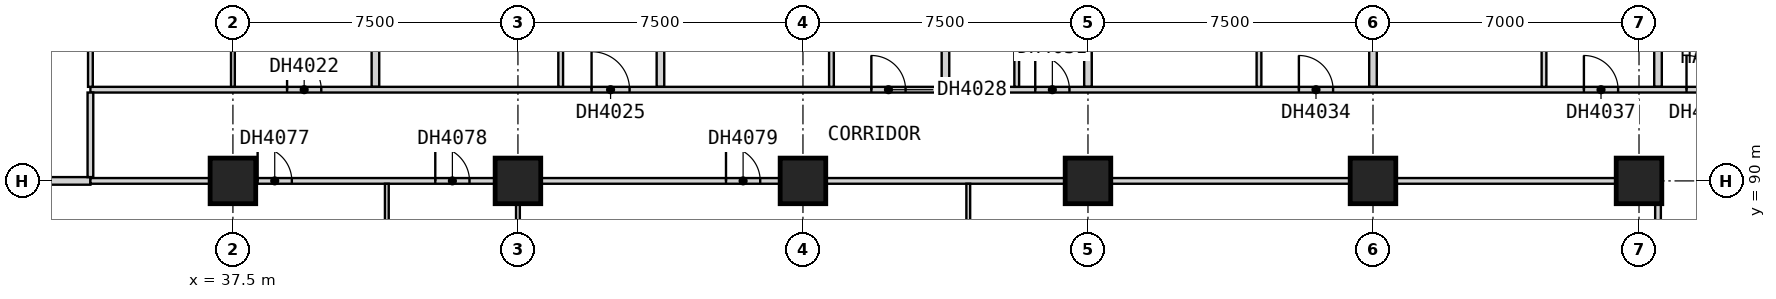
"""IFC4 building model, lengths in metres.
Left out: names, types, materials, properties, quantities, classifications, styles, units other than length and angle.
Written with IfcOpenShell. Run it as: python <this file> out.ifc"""

import sys

from ifc_helpers import new_model, si_unit, direction, frame, frame_2d, origin, origin_2d, place, context, subcontext, project, spatial, rectangle, extrude, element, fill, save


model = new_model("IFC4")
c1 = context("Model", 3, precision=1e-05, world=origin(), true_north=direction((0.0, 1.0)))
c2 = subcontext(c1, "Body", "Model", "MODEL_VIEW")
j1 = project(units=[si_unit("LENGTHUNIT", "METRE"), si_unit("PLANEANGLEUNIT", "RADIAN")], contexts=[c1])
p1 = place(None, origin())
s1 = spatial("IfcSite", under=j1, at=p1, CompositionType="ELEMENT")
p2 = place(p1, origin())
s2 = spatial("IfcBuilding", under=s1, at=p2, CompositionType="ELEMENT")
p3 = place(p2, frame((0.0, 0.0, 44.8)))
s3 = spatial("IfcBuildingStorey", under=s2, at=p3, CompositionType="ELEMENT", Elevation=44.8)
for number, where, z_axis, x_axis in (
    (1, (37.5, 90.0, 0.0), (0.0, 0.0, 1.0), (1.0, 0.0, 0.0)),
    (2, (45.0, 90.0, 0.0), (0.0, 0.0, 1.0), (1.0, 0.0, 0.0)),
    (3, (52.5, 90.0, 0.0), (0.0, 0.0, 1.0), (1.0, 0.0, 0.0)),
    (4, (60.0, 90.0, 0.0), (0.0, 0.0, 1.0), (1.0, 0.0, 0.0)),
    (5, (67.5, 90.0, 0.0), (0.0, 0.0, 1.0), (1.0, 0.0, 0.0)),
    (6, (74.5, 90.0, 0.0), (0.0, 0.0, 1.0), (1.0, 0.0, 0.0)),
):
    element("IfcColumn", number, at=place(p3, frame(where, z_axis=z_axis, x_axis=x_axis)), inside=s3, PredefinedType="COLUMN", context=c2, shape_type="SweptSolid", body=[
        extrude(rectangle(XDim=1.2, YDim=1.2, at=origin_2d()), origin(), (0.0, 0.0, 1.0), 3.6),
    ])
p4 = place(p3, frame((30.0, 90.0, 0.0), z_axis=(0.0, 0.0, 1.0), x_axis=(1.0, 0.0, 0.0)))
e7 = element("IfcWall", 7, at=p4, inside=s3, PredefinedType="PARTITIONING", context=c2, shape_type="SweptSolid", body=[
    extrude(rectangle(XDim=3.75, YDim=0.2, at=frame_2d((1.875, 0.0))), origin(), (0.0, 0.0, 1.0), 3.35),
])
for number, where, z_axis, x_axis in (
    (8, (41.25, 92.475, 0.0), (0.0, 0.0, 1.0), (0.0, 1.0, 0.0)),
    (9, (48.75, 92.475, 0.0), (0.0, 0.0, 1.0), (0.0, 1.0, 0.0)),
    (10, (56.25, 92.475, 0.0), (0.0, 0.0, 1.0), (0.0, 1.0, 0.0)),
):
    element("IfcWall", number, at=place(p3, frame(where, z_axis=z_axis, x_axis=x_axis)), inside=s3, PredefinedType="PARTITIONING", context=c2, shape_type="SweptSolid", body=[
        extrude(rectangle(XDim=11.715, YDim=0.2, at=frame_2d((5.857, 0.0))), origin(), (0.0, 0.0, 1.0), 3.35),
    ])
for number, where, z_axis, x_axis in (
    (11, (60.0, 92.475, 0.0), (0.0, 0.0, 1.0), (0.0, 1.0, 0.0)),
    (12, (67.5, 92.475, 0.0), (0.0, 0.0, 1.0), (0.0, 1.0, 0.0)),
):
    element("IfcWall", number, at=place(p3, frame(where, z_axis=z_axis, x_axis=x_axis)), inside=s3, PredefinedType="PARTITIONING", context=c2, shape_type="SweptSolid", body=[
        extrude(rectangle(XDim=12.525, YDim=0.2, at=frame_2d((6.262, 0.0))), origin(), (0.0, 0.0, 1.0), 3.35),
    ])
p5 = place(p3, frame((75.0, 92.475, 0.0), z_axis=(0.0, 0.0, 1.0), x_axis=(0.0, 1.0, 0.0)))
e13 = element("IfcWall", 13, at=p5, inside=s3, PredefinedType="PARTITIONING", context=c2, shape_type="SweptSolid", body=[
    extrude(rectangle(XDim=11.715, YDim=0.2, at=frame_2d((5.857, 0.0))), origin(), (0.0, 0.0, 1.0), 3.35),
])
p6 = place(p3, frame((33.75, 90.0, 0.0), z_axis=(0.0, 0.0, 1.0), x_axis=(1.0, 0.0, 0.0)))
e14 = element("IfcWall", 14, at=p6, inside=s3, PredefinedType="PARTITIONING", context=c2, shape_type="SweptSolid", body=[
    extrude(rectangle(XDim=41.25, YDim=0.15, at=frame_2d((20.625, 0.0))), origin(), (0.0, 0.0, 1.0), 3.35),
])
p7 = place(p6, frame((4.4, 0.0, 0.0)))
e15 = element("IfcOpeningElement", 15, at=p7, cuts=e14, PredefinedType="OPENING", context=c2, shape_type="SweptSolid", body=[
    extrude(rectangle(XDim=0.9, YDim=2.1, at=frame_2d((0.45, 1.05))), frame((0.0, 0.085, 0.0), z_axis=(0.0, -1.0, 0.0), x_axis=(1.0, 0.0, 0.0)), (0.0, 0.0, 1.0), 0.17),
])
p8 = place(p6, frame((9.075, 0.0, 0.0)))
e16 = element("IfcOpeningElement", 16, at=p8, cuts=e14, PredefinedType="OPENING", context=c2, shape_type="SweptSolid", body=[
    extrude(rectangle(XDim=0.9, YDim=2.1, at=frame_2d((0.45, 1.05))), frame((0.0, 0.085, 0.0), z_axis=(0.0, -1.0, 0.0), x_axis=(1.0, 0.0, 0.0)), (0.0, 0.0, 1.0), 0.17),
])
p9 = place(p6, frame((16.725, 0.0, 0.0)))
e17 = element("IfcOpeningElement", 17, at=p9, cuts=e14, PredefinedType="OPENING", context=c2, shape_type="SweptSolid", body=[
    extrude(rectangle(XDim=0.9, YDim=2.1, at=frame_2d((0.45, 1.05))), frame((0.0, 0.085, 0.0), z_axis=(0.0, -1.0, 0.0), x_axis=(1.0, 0.0, 0.0)), (0.0, 0.0, 1.0), 0.17),
])
p10 = place(p3, frame((33.75, 92.4, 0.0), z_axis=(0.0, 0.0, 1.0), x_axis=(1.0, 0.0, 0.0)))
e18 = element("IfcWall", 18, at=p10, inside=s3, PredefinedType="PARTITIONING", context=c2, shape_type="SweptSolid", body=[
    extrude(rectangle(XDim=43.65, YDim=0.15, at=frame_2d((21.825, 0.0))), origin(), (0.0, 0.0, 1.0), 3.35),
])
p11 = place(p10, frame((5.175, 0.0, 0.0)))
e19 = element("IfcOpeningElement", 19, at=p11, cuts=e18, PredefinedType="OPENING", context=c2, shape_type="SweptSolid", body=[
    extrude(rectangle(XDim=0.9, YDim=2.1, at=frame_2d((0.45, 1.05))), frame((0.0, 0.085, 0.0), z_axis=(0.0, -1.0, 0.0), x_axis=(1.0, 0.0, 0.0)), (0.0, 0.0, 1.0), 0.17),
])
p12 = place(p10, frame((13.188, 0.0, 0.0)))
e20 = element("IfcOpeningElement", 20, at=p12, cuts=e18, PredefinedType="OPENING", context=c2, shape_type="SweptSolid", body=[
    extrude(rectangle(XDim=1.0, YDim=2.1, at=frame_2d((0.5, 1.05))), frame((0.0, 0.085, 0.0), z_axis=(0.0, -1.0, 0.0), x_axis=(1.0, 0.0, 0.0)), (0.0, 0.0, 1.0), 0.17),
])
p13 = place(p10, frame((20.55, 0.0, 0.0)))
e21 = element("IfcOpeningElement", 21, at=p13, cuts=e18, PredefinedType="OPENING", context=c2, shape_type="SweptSolid", body=[
    extrude(rectangle(XDim=0.9, YDim=2.1, at=frame_2d((0.45, 1.05))), frame((0.0, 0.085, 0.0), z_axis=(0.0, -1.0, 0.0), x_axis=(1.0, 0.0, 0.0)), (0.0, 0.0, 1.0), 0.17),
])
p14 = place(p10, frame((24.863, 0.0, 0.0)))
e22 = element("IfcOpeningElement", 22, at=p14, cuts=e18, PredefinedType="OPENING", context=c2, shape_type="SweptSolid", body=[
    extrude(rectangle(XDim=0.9, YDim=2.1, at=frame_2d((0.45, 1.05))), frame((0.0, 0.085, 0.0), z_axis=(0.0, -1.0, 0.0), x_axis=(1.0, 0.0, 0.0)), (0.0, 0.0, 1.0), 0.17),
])
p15 = place(p10, frame((31.8, 0.0, 0.0)))
e23 = element("IfcOpeningElement", 23, at=p15, cuts=e18, PredefinedType="OPENING", context=c2, shape_type="SweptSolid", body=[
    extrude(rectangle(XDim=0.9, YDim=2.1, at=frame_2d((0.45, 1.05))), frame((0.0, 0.085, 0.0), z_axis=(0.0, -1.0, 0.0), x_axis=(1.0, 0.0, 0.0)), (0.0, 0.0, 1.0), 0.17),
])
p16 = place(p10, frame((39.3, 0.0, 0.0)))
e24 = element("IfcOpeningElement", 24, at=p16, cuts=e18, PredefinedType="OPENING", context=c2, shape_type="SweptSolid", body=[
    extrude(rectangle(XDim=0.9, YDim=2.1, at=frame_2d((0.45, 1.05))), frame((0.0, 0.085, 0.0), z_axis=(0.0, -1.0, 0.0), x_axis=(1.0, 0.0, 0.0)), (0.0, 0.0, 1.0), 0.17),
])
p17 = place(p10, frame((42.0, 0.0, 0.0)))
e25 = element("IfcOpeningElement", 25, at=p17, cuts=e18, PredefinedType="OPENING", context=c2, shape_type="SweptSolid", body=[
    extrude(rectangle(XDim=0.9, YDim=2.1, at=frame_2d((0.45, 1.05))), frame((0.0, 0.085, 0.0), z_axis=(0.0, -1.0, 0.0), x_axis=(1.0, 0.0, 0.0)), (0.0, 0.0, 1.0), 0.17),
])
p18 = place(p3, frame((33.75, 90.1, 0.0), z_axis=(0.0, 0.0, 1.0), x_axis=(0.0, 1.0, 0.0)))
e26 = element("IfcWall", 26, at=p18, inside=s3, PredefinedType="PARTITIONING", context=c2, shape_type="SweptSolid", body=[
    extrude(rectangle(XDim=2.225, YDim=0.15, at=frame_2d((1.112, 0.0))), origin(), (0.0, 0.0, 1.0), 3.35),
])
p19 = place(p3, frame((75.0, 78.075, 0.0), z_axis=(0.0, 0.0, 1.0), x_axis=(0.0, 1.0, 0.0)))
e27 = element("IfcWall", 27, at=p19, inside=s3, PredefinedType="PARTITIONING", context=c2, shape_type="SweptSolid", body=[
    extrude(rectangle(XDim=11.85, YDim=0.15, at=frame_2d((5.925, 0.0))), origin(), (0.0, 0.0, 1.0), 3.35),
])
p20 = place(p19, frame((7.725, 0.0, 0.0)))
e28 = element("IfcOpeningElement", 28, at=p20, cuts=e27, PredefinedType="OPENING", context=c2, shape_type="SweptSolid", body=[
    extrude(rectangle(XDim=0.9, YDim=2.1, at=frame_2d((0.45, 1.05))), frame((0.0, 0.085, 0.0), z_axis=(0.0, -1.0, 0.0), x_axis=(1.0, 0.0, 0.0)), (0.0, 0.0, 1.0), 0.17),
])
p21 = place(p19, frame((1.725, 0.0, 0.0)))
e29 = element("IfcOpeningElement", 29, at=p21, cuts=e27, PredefinedType="OPENING", context=c2, shape_type="SweptSolid", body=[
    extrude(rectangle(XDim=0.9, YDim=2.1, at=frame_2d((0.45, 1.05))), frame((0.0, 0.085, 0.0), z_axis=(0.0, -1.0, 0.0), x_axis=(1.0, 0.0, 0.0)), (0.0, 0.0, 1.0), 0.17),
])
p22 = place(p3, frame((37.5, 92.475, 0.0), z_axis=(0.0, 0.0, 1.0), x_axis=(0.0, 1.0, 0.0)))
e30 = element("IfcWall", 30, at=p22, inside=s3, PredefinedType="PARTITIONING", context=c2, shape_type="SweptSolid", body=[
    extrude(rectangle(XDim=4.475, YDim=0.1, at=frame_2d((2.237, 0.0))), origin(), (0.0, 0.0, 1.0), 3.35),
])
p23 = place(p22, frame((1.775, 0.0, 0.0)))
e31 = element("IfcOpeningElement", 31, at=p23, cuts=e30, PredefinedType="OPENING", context=c2, shape_type="SweptSolid", body=[
    extrude(rectangle(XDim=0.9, YDim=2.1, at=frame_2d((0.45, 1.05))), frame((0.0, 0.06, 0.0), z_axis=(0.0, -1.0, 0.0), x_axis=(1.0, 0.0, 0.0)), (0.0, 0.0, 1.0), 0.12),
])
for number, where, z_axis, x_axis in (
    (32, (41.55, 82.5, 0.0), (0.0, 0.0, 1.0), (0.0, 1.0, 0.0)),
    (33, (45.0, 82.5, 0.0), (0.0, 0.0, 1.0), (0.0, 1.0, 0.0)),
    (34, (56.85, 82.5, 0.0), (0.0, 0.0, 1.0), (0.0, 1.0, 0.0)),
):
    element("IfcWall", number, at=place(p3, frame(where, z_axis=z_axis, x_axis=x_axis)), inside=s3, PredefinedType="PARTITIONING", context=c2, shape_type="SweptSolid", body=[
        extrude(rectangle(XDim=7.425, YDim=0.1, at=frame_2d((3.712, 0.0))), origin(), (0.0, 0.0, 1.0), 3.35),
    ])
for number, where, z_axis, x_axis in (
    (35, (33.75, 92.475, 0.0), (0.0, 0.0, 1.0), (0.0, 1.0, 0.0)),
    (36, (46.125, 92.475, 0.0), (0.0, 0.0, 1.0), (0.0, 1.0, 0.0)),
    (37, (53.25, 92.475, 0.0), (0.0, 0.0, 1.0), (0.0, 1.0, 0.0)),
    (38, (58.125, 92.475, 0.0), (0.0, 0.0, 1.0), (0.0, 1.0, 0.0)),
    (39, (64.5, 92.475, 0.0), (0.0, 0.0, 1.0), (0.0, 1.0, 0.0)),
    (40, (72.0, 92.475, 0.0), (0.0, 0.0, 1.0), (0.0, 1.0, 0.0)),
):
    element("IfcWall", number, at=place(p3, frame(where, z_axis=z_axis, x_axis=x_axis)), inside=s3, PredefinedType="PARTITIONING", context=c2, shape_type="SweptSolid", body=[
        extrude(rectangle(XDim=4.462, YDim=0.125, at=frame_2d((2.231, 0.0))), origin(), (0.0, 0.0, 1.0), 3.35),
    ])
p24 = place(p11, origin())
e41 = element("IfcDoor", 41, at=p24, inside=s3, OperationType="SINGLE_SWING_LEFT", PredefinedType="DOOR", context=c2, shape_type="SweptSolid", body=[
    extrude(rectangle(XDim=0.9, YDim=2.1, at=frame_2d((0.45, 1.05))), frame((0.0, 0.025, 0.0), z_axis=(0.0, -1.0, 0.0), x_axis=(1.0, 0.0, 0.0)), (0.0, 0.0, 1.0), 0.05),
])
fill(e19, e41)
p25 = place(p12, origin())
e42 = element("IfcDoor", 42, at=p25, inside=s3, OperationType="SINGLE_SWING_LEFT", PredefinedType="DOOR", context=c2, shape_type="SweptSolid", body=[
    extrude(rectangle(XDim=1.0, YDim=2.1, at=frame_2d((0.5, 1.05))), frame((0.0, 0.025, 0.0), z_axis=(0.0, -1.0, 0.0), x_axis=(1.0, 0.0, 0.0)), (0.0, 0.0, 1.0), 0.05),
])
fill(e20, e42)
p26 = place(p13, origin())
e43 = element("IfcDoor", 43, at=p26, inside=s3, OperationType="SINGLE_SWING_LEFT", PredefinedType="DOOR", context=c2, shape_type="SweptSolid", body=[
    extrude(rectangle(XDim=0.9, YDim=2.1, at=frame_2d((0.45, 1.05))), frame((0.0, 0.025, 0.0), z_axis=(0.0, -1.0, 0.0), x_axis=(1.0, 0.0, 0.0)), (0.0, 0.0, 1.0), 0.05),
])
fill(e21, e43)
p27 = place(p14, origin())
e44 = element("IfcDoor", 44, at=p27, inside=s3, OperationType="SINGLE_SWING_LEFT", PredefinedType="DOOR", context=c2, shape_type="SweptSolid", body=[
    extrude(rectangle(XDim=0.9, YDim=2.1, at=frame_2d((0.45, 1.05))), frame((0.0, 0.025, 0.0), z_axis=(0.0, -1.0, 0.0), x_axis=(1.0, 0.0, 0.0)), (0.0, 0.0, 1.0), 0.05),
])
fill(e22, e44)
p28 = place(p15, origin())
e45 = element("IfcDoor", 45, at=p28, inside=s3, OperationType="SINGLE_SWING_LEFT", PredefinedType="DOOR", context=c2, shape_type="SweptSolid", body=[
    extrude(rectangle(XDim=0.9, YDim=2.1, at=frame_2d((0.45, 1.05))), frame((0.0, 0.025, 0.0), z_axis=(0.0, -1.0, 0.0), x_axis=(1.0, 0.0, 0.0)), (0.0, 0.0, 1.0), 0.05),
])
fill(e23, e45)
p29 = place(p16, origin())
e46 = element("IfcDoor", 46, at=p29, inside=s3, OperationType="SINGLE_SWING_LEFT", PredefinedType="DOOR", context=c2, shape_type="SweptSolid", body=[
    extrude(rectangle(XDim=0.9, YDim=2.1, at=frame_2d((0.45, 1.05))), frame((0.0, 0.025, 0.0), z_axis=(0.0, -1.0, 0.0), x_axis=(1.0, 0.0, 0.0)), (0.0, 0.0, 1.0), 0.05),
])
fill(e24, e46)
p30 = place(p17, origin())
e47 = element("IfcDoor", 47, at=p30, inside=s3, OperationType="SINGLE_SWING_RIGHT", PredefinedType="DOOR", context=c2, shape_type="SweptSolid", body=[
    extrude(rectangle(XDim=0.9, YDim=2.1, at=frame_2d((0.45, 1.05))), frame((0.0, 0.025, 0.0), z_axis=(0.0, -1.0, 0.0), x_axis=(1.0, 0.0, 0.0)), (0.0, 0.0, 1.0), 0.05),
])
fill(e25, e47)
p31 = place(p7, origin())
e48 = element("IfcDoor", 48, at=p31, inside=s3, OperationType="SINGLE_SWING_LEFT", PredefinedType="DOOR", context=c2, shape_type="SweptSolid", body=[
    extrude(rectangle(XDim=0.9, YDim=2.1, at=frame_2d((0.45, 1.05))), frame((0.0, 0.025, 0.0), z_axis=(0.0, -1.0, 0.0), x_axis=(1.0, 0.0, 0.0)), (0.0, 0.0, 1.0), 0.05),
])
fill(e15, e48)
p32 = place(p8, origin())
e49 = element("IfcDoor", 49, at=p32, inside=s3, OperationType="SINGLE_SWING_RIGHT", PredefinedType="DOOR", context=c2, shape_type="SweptSolid", body=[
    extrude(rectangle(XDim=0.9, YDim=2.1, at=frame_2d((0.45, 1.05))), frame((0.0, 0.025, 0.0), z_axis=(0.0, -1.0, 0.0), x_axis=(1.0, 0.0, 0.0)), (0.0, 0.0, 1.0), 0.05),
])
fill(e16, e49)
p33 = place(p9, origin())
e50 = element("IfcDoor", 50, at=p33, inside=s3, OperationType="SINGLE_SWING_RIGHT", PredefinedType="DOOR", context=c2, shape_type="SweptSolid", body=[
    extrude(rectangle(XDim=0.9, YDim=2.1, at=frame_2d((0.45, 1.05))), frame((0.0, 0.025, 0.0), z_axis=(0.0, -1.0, 0.0), x_axis=(1.0, 0.0, 0.0)), (0.0, 0.0, 1.0), 0.05),
])
fill(e17, e50)
save(model, sys.argv[1])
